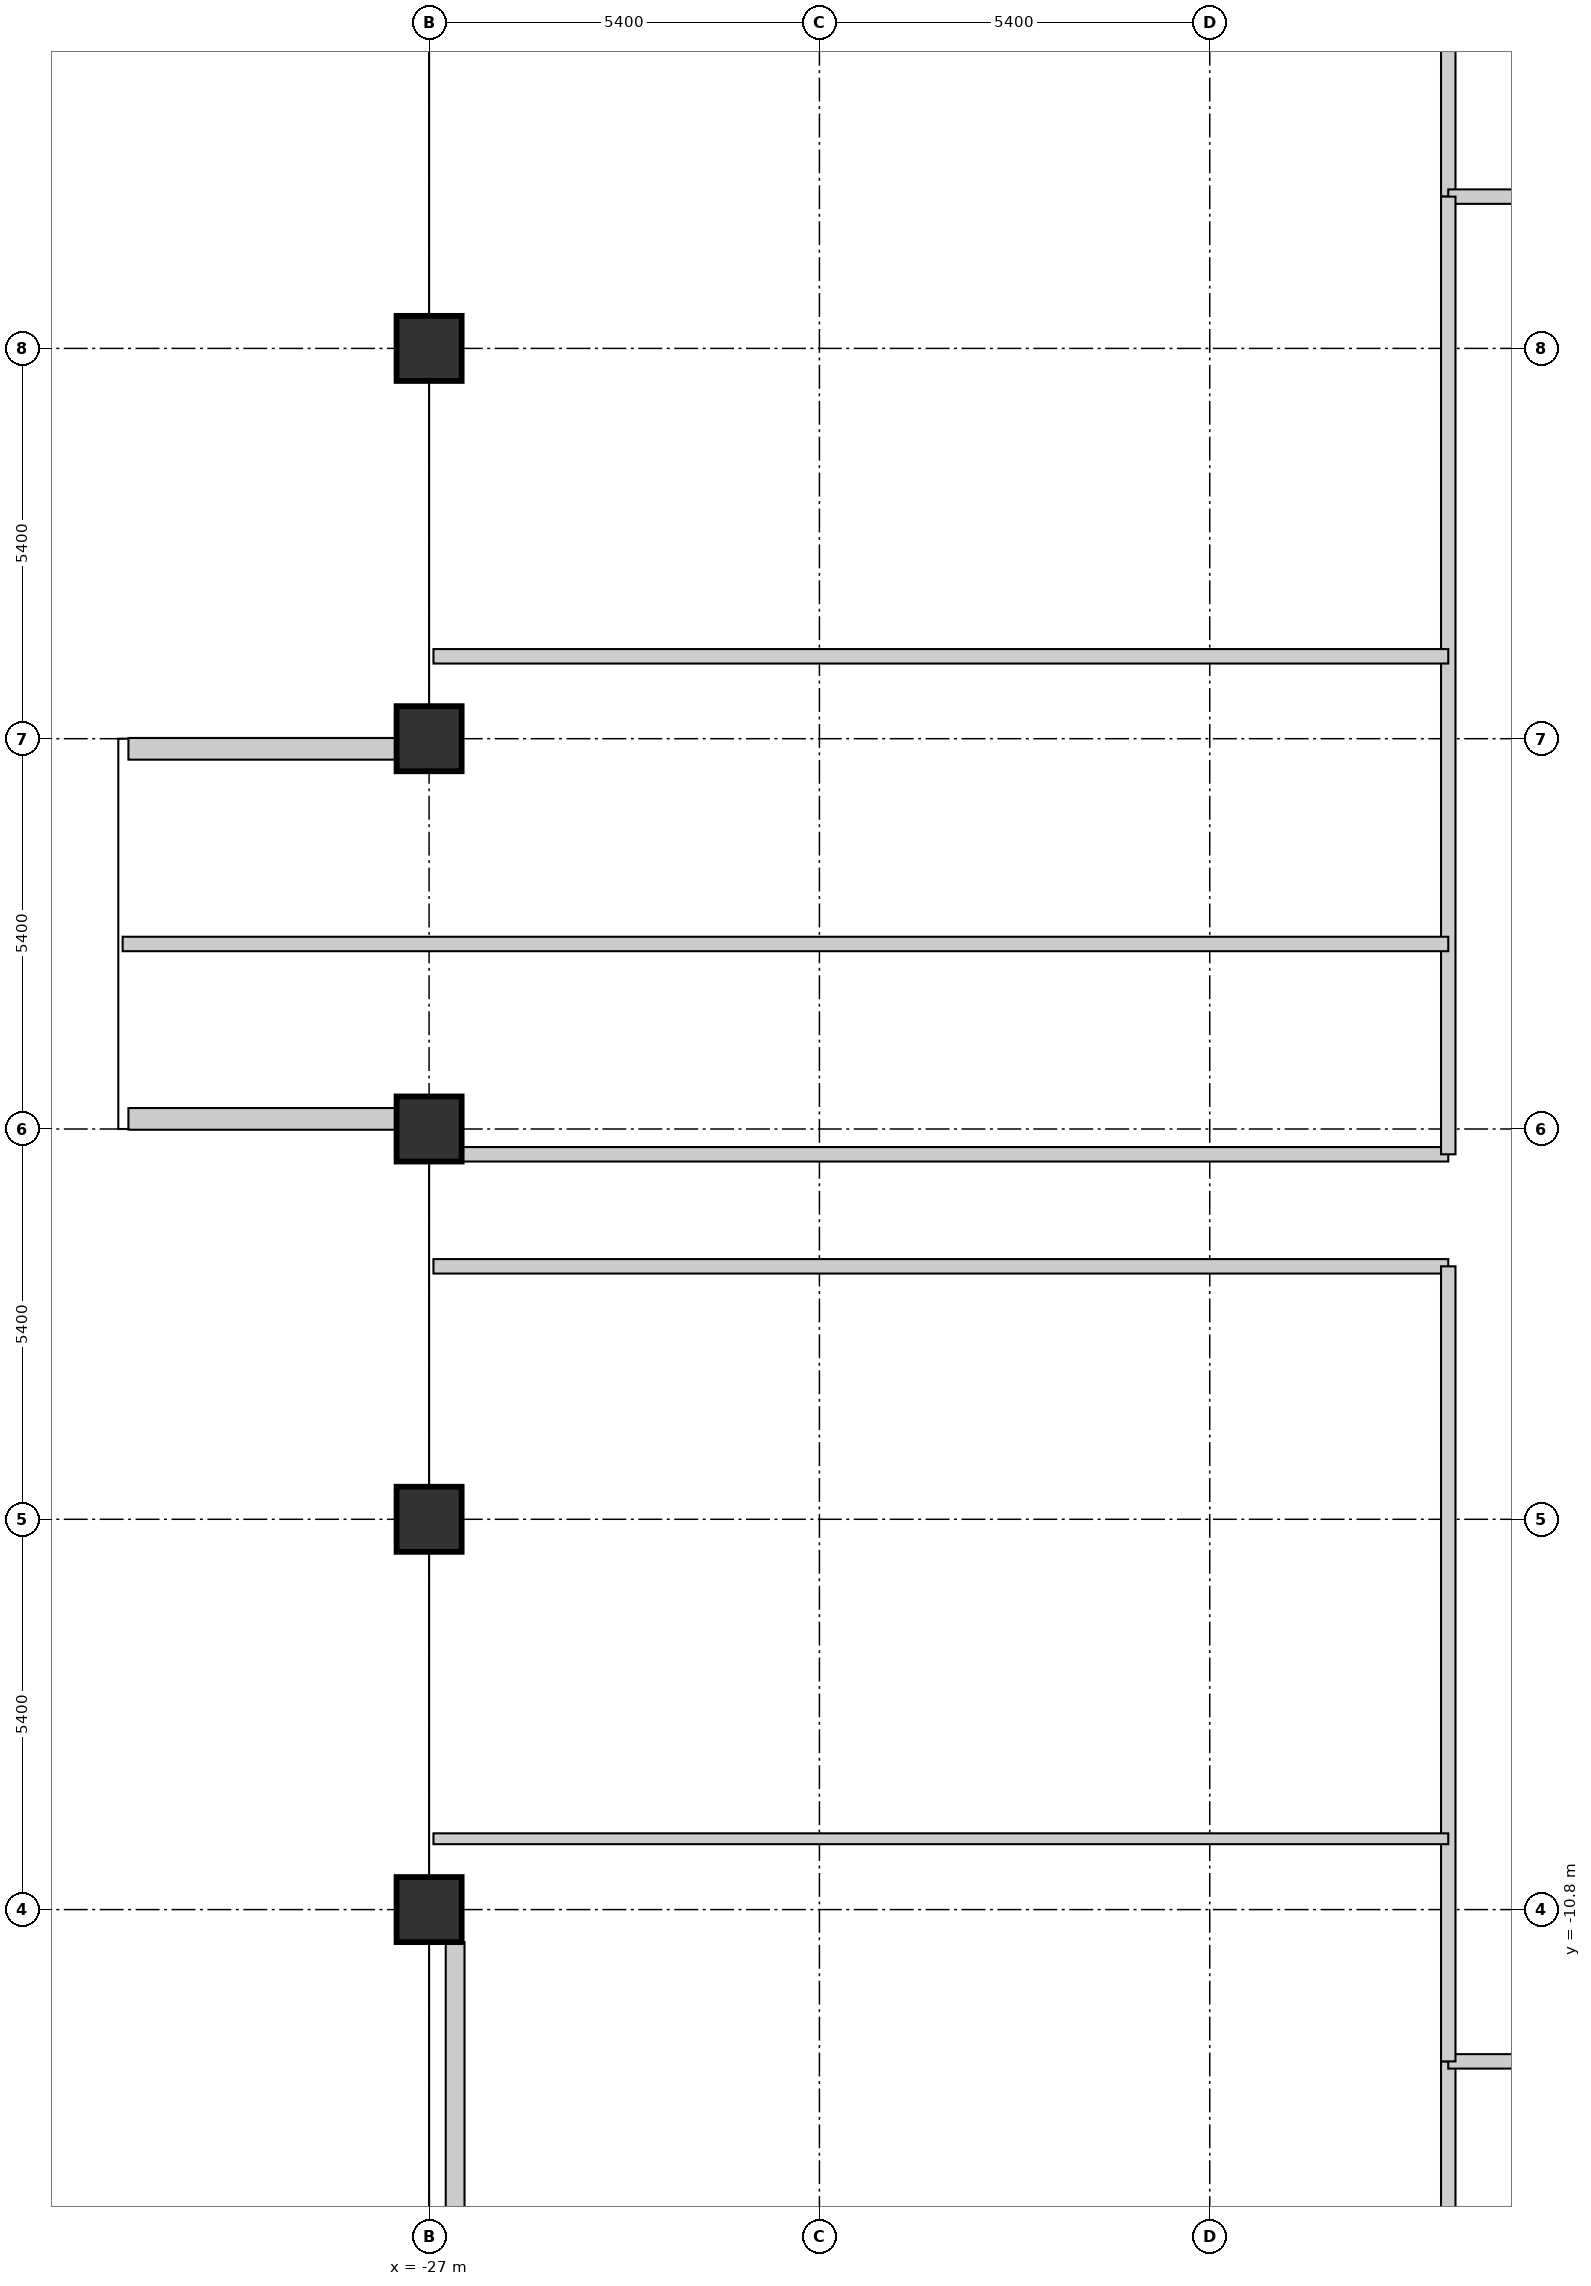
"""IFC4 building model, lengths in metres.
Left out: names, types, materials, properties, quantities, classifications, styles, units other than length and angle.
Written with IfcOpenShell. Run it as: python <this file> out.ifc"""

import sys

from ifc_helpers import new_model, si_unit, direction, frame, frame_2d, origin, origin_2d, place, context, subcontext, project, spatial, rectangle, extrude, element, fill, save


model = new_model("IFC4")
c1 = context("Model", 3, precision=1e-05, world=origin(), true_north=direction((0.0, 1.0)))
c2 = subcontext(c1, "Body", "Model", "MODEL_VIEW")
j1 = project(units=[si_unit("LENGTHUNIT", "METRE"), si_unit("PLANEANGLEUNIT", "RADIAN")], contexts=[c1])
p1 = place(None, origin())
s1 = spatial("IfcSite", under=j1, at=p1, CompositionType="ELEMENT")
p2 = place(p1, origin())
s2 = spatial("IfcBuilding", under=s1, at=p2, CompositionType="ELEMENT")
p3 = place(p2, frame((0.0, 0.0, 174.75)))
s3 = spatial("IfcBuildingStorey", under=s2, at=p3, CompositionType="ELEMENT", Elevation=174.75)
for number, where, z_axis, x_axis in (
    (1, (-27.0, -10.8, 0.0), (0.0, 0.0, 1.0), (1.0, 0.0, 0.0)),
    (2, (-27.0, -5.4, 0.0), (0.0, 0.0, 1.0), (1.0, 0.0, 0.0)),
    (3, (-27.0, 0.0, 0.0), (0.0, 0.0, 1.0), (1.0, 0.0, 0.0)),
    (4, (-27.0, 5.4, 0.0), (0.0, 0.0, 1.0), (1.0, 0.0, 0.0)),
    (5, (-27.0, 10.8, 0.0), (0.0, 0.0, 1.0), (1.0, 0.0, 0.0)),
):
    element("IfcColumn", number, at=place(p3, frame(where, z_axis=z_axis, x_axis=x_axis)), inside=s3, PredefinedType="COLUMN", context=c2, shape_type="SweptSolid", body=[
        extrude(rectangle(XDim=0.9, YDim=0.9, at=origin_2d()), origin(), (0.0, 0.0, 1.0), 3.75),
    ])
p4 = place(p3, frame((-31.16, 0.14, 0.0), z_axis=(0.0, 0.0, 1.0), x_axis=(1.0, 0.0, 0.0)))
e6 = element("IfcWall", 6, at=p4, inside=s3, PredefinedType="STANDARD", context=c2, shape_type="SweptSolid", body=[
    extrude(rectangle(XDim=3.706, YDim=0.3, at=frame_2d((1.853, 0.0))), origin(), (0.0, 0.0, 1.0), 2.857),
])
p5 = place(p4, frame((1.328, 0.0, 0.75)))
e7 = element("IfcOpeningElement", 7, at=p5, cuts=e6, PredefinedType="OPENING", context=c2, shape_type="SweptSolid", body=[
    extrude(rectangle(XDim=1.05, YDim=1.5, at=frame_2d((0.525, 0.75))), frame((0.0, 0.16, 0.0), z_axis=(0.0, -1.0, 0.0), x_axis=(1.0, 0.0, 0.0)), (0.0, 0.0, 1.0), 0.32),
])
p6 = place(p3, frame((-31.16, 5.26, 0.0), z_axis=(0.0, 0.0, 1.0), x_axis=(1.0, 0.0, 0.0)))
e8 = element("IfcWall", 8, at=p6, inside=s3, PredefinedType="STANDARD", context=c2, shape_type="SweptSolid", body=[
    extrude(rectangle(XDim=3.706, YDim=0.3, at=frame_2d((1.853, 0.0))), origin(), (0.0, 0.0, 1.0), 2.857),
])
p7 = place(p6, frame((1.328, 0.0, 0.75)))
e9 = element("IfcOpeningElement", 9, at=p7, cuts=e8, PredefinedType="OPENING", context=c2, shape_type="SweptSolid", body=[
    extrude(rectangle(XDim=1.05, YDim=1.5, at=frame_2d((0.525, 0.75))), frame((0.0, 0.16, 0.0), z_axis=(0.0, -1.0, 0.0), x_axis=(1.0, 0.0, 0.0)), (0.0, 0.0, 1.0), 0.32),
])
p8 = place(p3, frame((-26.64, -15.752, 0.0), z_axis=(0.0, 0.0, 1.0), x_axis=(0.0, 1.0, 0.0)))
e10 = element("IfcWall", 10, at=p8, inside=s3, PredefinedType="STANDARD", context=c2, shape_type="SweptSolid", body=[
    extrude(rectangle(XDim=4.504, YDim=0.26, at=frame_2d((2.252, 0.0))), origin(), (0.0, 0.0, 1.0), 2.78),
])
p9 = place(p3, frame((-12.9, 12.9, 0.0), z_axis=(0.0, 0.0, 1.0), x_axis=(0.0, 1.0, 0.0)))
e11 = element("IfcWall", 11, at=p9, inside=s3, PredefinedType="PARTITIONING", context=c2, shape_type="SweptSolid", body=[
    extrude(rectangle(XDim=12.94, YDim=0.2, at=frame_2d((6.47, 0.0))), origin(), (0.0, 0.0, 1.0), 2.78),
])
p10 = place(p3, frame((-12.9, -21.54, 0.0), z_axis=(0.0, 0.0, 1.0), x_axis=(0.0, 1.0, 0.0)))
e12 = element("IfcWall", 12, at=p10, inside=s3, PredefinedType="PARTITIONING", context=c2, shape_type="SweptSolid", body=[
    extrude(rectangle(XDim=8.64, YDim=0.2, at=frame_2d((4.32, 0.0))), origin(), (0.0, 0.0, 1.0), 2.78),
])
p11 = place(p3, frame((-12.9, 12.9, 0.0), z_axis=(0.0, 0.0, 1.0), x_axis=(1.0, 0.0, 0.0)))
e13 = element("IfcWall", 13, at=p11, inside=s3, PredefinedType="PARTITIONING", context=c2, shape_type="SweptSolid", body=[
    extrude(rectangle(XDim=10.6, YDim=0.2, at=frame_2d((5.3, 0.0))), origin(), (0.0, 0.0, 1.0), 3.006),
])
p12 = place(p11, frame((0.28, 0.0, 0.0)))
e14 = element("IfcOpeningElement", 14, at=p12, cuts=e13, PredefinedType="OPENING", context=c2, shape_type="SweptSolid", body=[
    extrude(rectangle(XDim=0.85, YDim=2.1, at=frame_2d((0.425, 1.05))), frame((0.0, 0.11, 0.0), z_axis=(0.0, -1.0, 0.0), x_axis=(1.0, 0.0, 0.0)), (0.0, 0.0, 1.0), 0.22),
])
p13 = place(p11, frame((4.31, 0.0, 0.0)))
e15 = element("IfcOpeningElement", 15, at=p13, cuts=e13, PredefinedType="OPENING", context=c2, shape_type="SweptSolid", body=[
    extrude(rectangle(XDim=0.85, YDim=2.1, at=frame_2d((0.425, 1.05))), frame((0.0, 0.11, 0.0), z_axis=(0.0, -1.0, 0.0), x_axis=(1.0, 0.0, 0.0)), (0.0, 0.0, 1.0), 0.22),
])
p14 = place(p3, frame((-12.9, -12.9, 0.0), z_axis=(0.0, 0.0, 1.0), x_axis=(1.0, 0.0, 0.0)))
e16 = element("IfcWall", 16, at=p14, inside=s3, PredefinedType="PARTITIONING", context=c2, shape_type="SweptSolid", body=[
    extrude(rectangle(XDim=18.1, YDim=0.2, at=frame_2d((9.05, 0.0))), origin(), (0.0, 0.0, 1.0), 3.006),
])
p15 = place(p14, frame((4.075, 0.0, 0.0)))
e17 = element("IfcOpeningElement", 17, at=p15, cuts=e16, PredefinedType="OPENING", context=c2, shape_type="SweptSolid", body=[
    extrude(rectangle(XDim=0.85, YDim=2.1, at=frame_2d((0.425, 1.05))), frame((0.0, 0.11, 0.0), z_axis=(0.0, -1.0, 0.0), x_axis=(1.0, 0.0, 0.0)), (0.0, 0.0, 1.0), 0.22),
])
p16 = place(p14, frame((13.125, 0.0, 0.0)))
e18 = element("IfcOpeningElement", 18, at=p16, cuts=e16, PredefinedType="OPENING", context=c2, shape_type="SweptSolid", body=[
    extrude(rectangle(XDim=0.85, YDim=2.1, at=frame_2d((0.425, 1.05))), frame((0.0, 0.11, 0.0), z_axis=(0.0, -1.0, 0.0), x_axis=(1.0, 0.0, 0.0)), (0.0, 0.0, 1.0), 0.22),
])
for number, where, z_axis, x_axis in (
    (19, (-26.94, -0.35, 0.0), (0.0, 0.0, 1.0), (1.0, 0.0, 0.0)),
    (20, (-26.94, -1.9, 0.0), (0.0, 0.0, 1.0), (1.0, 0.0, 0.0)),
):
    element("IfcWall", number, at=place(p3, frame(where, z_axis=z_axis, x_axis=x_axis)), inside=s3, PredefinedType="PARTITIONING", context=c2, shape_type="SweptSolid", body=[
        extrude(rectangle(XDim=14.04, YDim=0.2, at=frame_2d((7.02, 0.0))), origin(), (0.0, 0.0, 1.0), 2.78),
    ])
p17 = place(p3, frame((-12.9, -0.35, 0.0), z_axis=(0.0, 0.0, 1.0), x_axis=(0.0, 1.0, 0.0)))
e21 = element("IfcWall", 21, at=p17, inside=s3, PredefinedType="PARTITIONING", context=c2, shape_type="SweptSolid", body=[
    extrude(rectangle(XDim=13.25, YDim=0.2, at=frame_2d((6.625, 0.0))), origin(), (0.0, 0.0, 1.0), 3.006),
])
p18 = place(p17, frame((1.005, 0.0, 0.0)))
e22 = element("IfcOpeningElement", 22, at=p18, cuts=e21, PredefinedType="OPENING", context=c2, shape_type="SweptSolid", body=[
    extrude(rectangle(XDim=0.85, YDim=2.1, at=frame_2d((0.425, 1.05))), frame((0.0, 0.11, 0.0), z_axis=(0.0, -1.0, 0.0), x_axis=(1.0, 0.0, 0.0)), (0.0, 0.0, 1.0), 0.22),
])
p19 = place(p17, frame((4.45, 0.0, 0.0)))
e23 = element("IfcOpeningElement", 23, at=p19, cuts=e21, PredefinedType="OPENING", context=c2, shape_type="SweptSolid", body=[
    extrude(rectangle(XDim=0.85, YDim=2.1, at=frame_2d((0.425, 1.05))), frame((0.0, 0.11, 0.0), z_axis=(0.0, -1.0, 0.0), x_axis=(1.0, 0.0, 0.0)), (0.0, 0.0, 1.0), 0.22),
])
p20 = place(p17, frame((9.62, 0.0, 0.0)))
e24 = element("IfcOpeningElement", 24, at=p20, cuts=e21, PredefinedType="OPENING", context=c2, shape_type="SweptSolid", body=[
    extrude(rectangle(XDim=0.95, YDim=2.1, at=frame_2d((0.475, 1.05))), frame((0.0, 0.11, 0.0), z_axis=(0.0, -1.0, 0.0), x_axis=(1.0, 0.0, 0.0)), (0.0, 0.0, 1.0), 0.22),
])
p21 = place(p3, frame((-12.9, -12.9, 0.0), z_axis=(0.0, 0.0, 1.0), x_axis=(0.0, 1.0, 0.0)))
e25 = element("IfcWall", 25, at=p21, inside=s3, PredefinedType="PARTITIONING", context=c2, shape_type="SweptSolid", body=[
    extrude(rectangle(XDim=11.0, YDim=0.2, at=frame_2d((5.5, 0.0))), origin(), (0.0, 0.0, 1.0), 3.006),
])
p22 = place(p21, frame((1.09, 0.0, 0.0)))
e26 = element("IfcOpeningElement", 26, at=p22, cuts=e25, PredefinedType="OPENING", context=c2, shape_type="SweptSolid", body=[
    extrude(rectangle(XDim=0.85, YDim=2.1, at=frame_2d((0.425, 1.05))), frame((0.0, 0.11, 0.0), z_axis=(0.0, -1.0, 0.0), x_axis=(1.0, 0.0, 0.0)), (0.0, 0.0, 1.0), 0.22),
])
p23 = place(p21, frame((4.362, 0.0, 0.0)))
e27 = element("IfcOpeningElement", 27, at=p23, cuts=e25, PredefinedType="OPENING", context=c2, shape_type="SweptSolid", body=[
    extrude(rectangle(XDim=0.95, YDim=2.1, at=frame_2d((0.475, 1.05))), frame((0.0, 0.11, 0.0), z_axis=(0.0, -1.0, 0.0), x_axis=(1.0, 0.0, 0.0)), (0.0, 0.0, 1.0), 0.22),
])
p24 = place(p3, frame((-26.94, -9.82, 0.0), z_axis=(0.0, 0.0, 1.0), x_axis=(1.0, 0.0, 0.0)))
e28 = element("IfcWall", 28, at=p24, inside=s3, PredefinedType="PARTITIONING", context=c2, shape_type="SweptSolid", body=[
    extrude(rectangle(XDim=14.04, YDim=0.15, at=frame_2d((7.02, 0.0))), origin(), (0.0, 0.0, 1.0), 2.78),
])
p25 = place(p3, frame((-31.24, 2.56, 0.0), z_axis=(0.0, 0.0, 1.0), x_axis=(1.0, 0.0, 0.0)))
e29 = element("IfcWall", 29, at=p25, inside=s3, PredefinedType="PARTITIONING", context=c2, shape_type="SweptSolid", body=[
    extrude(rectangle(XDim=18.34, YDim=0.2, at=frame_2d((9.17, 0.0))), origin(), (0.0, 0.0, 1.0), 2.78),
])
p26 = place(p3, frame((-26.94, 6.54, 0.0), z_axis=(0.0, 0.0, 1.0), x_axis=(1.0, 0.0, 0.0)))
e30 = element("IfcWall", 30, at=p26, inside=s3, PredefinedType="PARTITIONING", context=c2, shape_type="SweptSolid", body=[
    extrude(rectangle(XDim=14.04, YDim=0.2, at=frame_2d((7.02, 0.0))), origin(), (0.0, 0.0, 1.0), 2.78),
])
p27 = place(p5, origin())
e31 = element("IfcWindow", 31, at=p27, inside=s3, PartitioningType="SINGLE_PANEL", PredefinedType="WINDOW", context=c2, shape_type="SweptSolid", body=[
    extrude(rectangle(XDim=1.05, YDim=1.5, at=frame_2d((0.525, 0.75))), frame((0.0, 0.03, 0.0), z_axis=(0.0, -1.0, 0.0), x_axis=(1.0, 0.0, 0.0)), (0.0, 0.0, 1.0), 0.06),
])
fill(e7, e31)
p28 = place(p7, origin())
e32 = element("IfcWindow", 32, at=p28, inside=s3, PartitioningType="SINGLE_PANEL", PredefinedType="WINDOW", context=c2, shape_type="SweptSolid", body=[
    extrude(rectangle(XDim=1.05, YDim=1.5, at=frame_2d((0.525, 0.75))), frame((0.0, 0.03, 0.0), z_axis=(0.0, -1.0, 0.0), x_axis=(1.0, 0.0, 0.0)), (0.0, 0.0, 1.0), 0.06),
])
fill(e9, e32)
p29 = place(p18, origin())
e33 = element("IfcDoor", 33, at=p29, inside=s3, OperationType="SINGLE_SWING_RIGHT", PredefinedType="DOOR", context=c2, shape_type="SweptSolid", body=[
    extrude(rectangle(XDim=0.85, YDim=2.1, at=frame_2d((0.425, 1.05))), frame((0.0, 0.025, 0.0), z_axis=(0.0, -1.0, 0.0), x_axis=(1.0, 0.0, 0.0)), (0.0, 0.0, 1.0), 0.05),
])
fill(e22, e33)
p30 = place(p19, origin())
e34 = element("IfcDoor", 34, at=p30, inside=s3, OperationType="SINGLE_SWING_LEFT", PredefinedType="DOOR", context=c2, shape_type="SweptSolid", body=[
    extrude(rectangle(XDim=0.85, YDim=2.1, at=frame_2d((0.425, 1.05))), frame((0.0, 0.025, 0.0), z_axis=(0.0, -1.0, 0.0), x_axis=(1.0, 0.0, 0.0)), (0.0, 0.0, 1.0), 0.05),
])
fill(e23, e34)
p31 = place(p20, origin())
e35 = element("IfcDoor", 35, at=p31, inside=s3, OperationType="SINGLE_SWING_RIGHT", PredefinedType="DOOR", context=c2, shape_type="SweptSolid", body=[
    extrude(rectangle(XDim=0.95, YDim=2.1, at=frame_2d((0.475, 1.05))), frame((0.0, 0.025, 0.0), z_axis=(0.0, -1.0, 0.0), x_axis=(1.0, 0.0, 0.0)), (0.0, 0.0, 1.0), 0.05),
])
fill(e24, e35)
p32 = place(p22, origin())
e36 = element("IfcDoor", 36, at=p32, inside=s3, OperationType="SINGLE_SWING_LEFT", PredefinedType="DOOR", context=c2, shape_type="SweptSolid", body=[
    extrude(rectangle(XDim=0.85, YDim=2.1, at=frame_2d((0.425, 1.05))), frame((0.0, 0.025, 0.0), z_axis=(0.0, -1.0, 0.0), x_axis=(1.0, 0.0, 0.0)), (0.0, 0.0, 1.0), 0.05),
])
fill(e26, e36)
p33 = place(p23, origin())
e37 = element("IfcDoor", 37, at=p33, inside=s3, OperationType="SINGLE_SWING_RIGHT", PredefinedType="DOOR", context=c2, shape_type="SweptSolid", body=[
    extrude(rectangle(XDim=0.95, YDim=2.1, at=frame_2d((0.475, 1.05))), frame((0.0, 0.025, 0.0), z_axis=(0.0, -1.0, 0.0), x_axis=(1.0, 0.0, 0.0)), (0.0, 0.0, 1.0), 0.05),
])
fill(e27, e37)
p34 = place(p12, origin())
e38 = element("IfcDoor", 38, at=p34, inside=s3, OperationType="SINGLE_SWING_LEFT", PredefinedType="DOOR", context=c2, shape_type="SweptSolid", body=[
    extrude(rectangle(XDim=0.85, YDim=2.1, at=frame_2d((0.425, 1.05))), frame((0.0, 0.025, 0.0), z_axis=(0.0, -1.0, 0.0), x_axis=(1.0, 0.0, 0.0)), (0.0, 0.0, 1.0), 0.05),
])
fill(e14, e38)
save(model, sys.argv[1])
